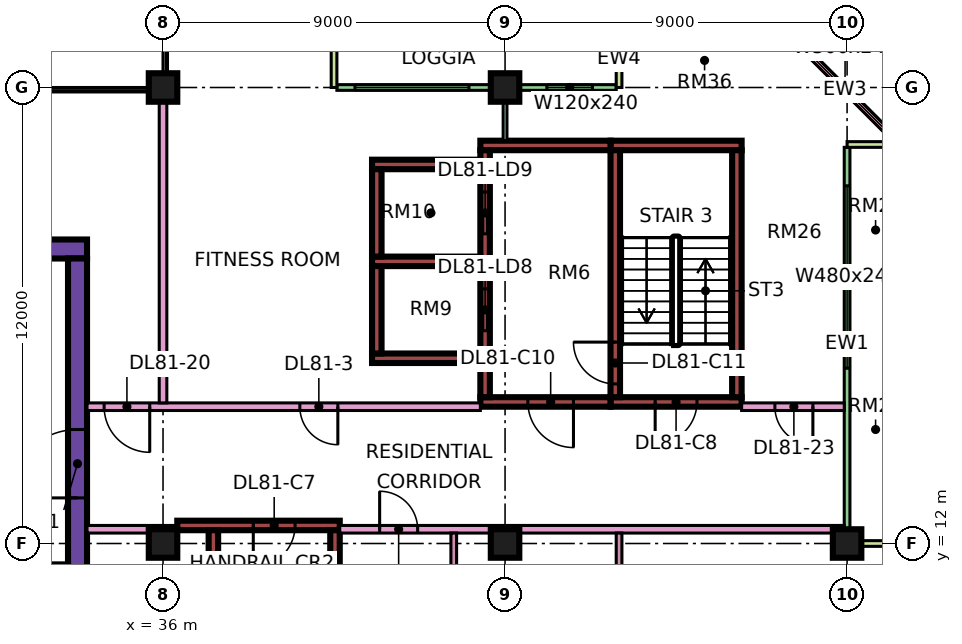
"""IFC4 building model, lengths in metres.
Left out: names, types, materials, properties, quantities, classifications, styles, units other than length and angle.
Written with IfcOpenShell. Run it as: python <this file> out.ifc"""

import sys

from ifc_helpers import new_model, si_unit, direction, frame, frame_2d, origin, origin_2d, place, context, subcontext, project, spatial, rectangle, extrude, element, fill, save


model = new_model("IFC4")
c1 = context("Model", 3, precision=1e-05, world=origin(), true_north=direction((0.0, 1.0)))
c2 = subcontext(c1, "Body", "Model", "MODEL_VIEW")
j1 = project(units=[si_unit("LENGTHUNIT", "METRE"), si_unit("PLANEANGLEUNIT", "RADIAN")], contexts=[c1])
p1 = place(None, origin())
s1 = spatial("IfcSite", under=j1, at=p1, CompositionType="ELEMENT")
p2 = place(p1, origin())
s2 = spatial("IfcBuilding", under=s1, at=p2, CompositionType="ELEMENT")
p3 = place(p2, frame((0.0, 0.0, 350.15)))
s3 = spatial("IfcBuildingStorey", under=s2, at=p3, CompositionType="ELEMENT", Elevation=350.15)
for number, where, z_axis, x_axis in (
    (1, (36.0, 12.0, 0.0), (0.0, 0.0, 1.0), (1.0, 0.0, 0.0)),
    (2, (36.0, 24.0, 0.0), (0.0, 0.0, 1.0), (1.0, 0.0, 0.0)),
    (3, (45.0, 12.0, 0.0), (0.0, 0.0, 1.0), (1.0, 0.0, 0.0)),
    (4, (45.0, 24.0, 0.0), (0.0, 0.0, 1.0), (1.0, 0.0, 0.0)),
    (5, (54.0, 12.0, 0.0), (0.0, 0.0, 1.0), (1.0, 0.0, 0.0)),
):
    element("IfcColumn", number, at=place(p3, frame(where, z_axis=z_axis, x_axis=x_axis)), inside=s3, PredefinedType="COLUMN", context=c2, shape_type="SweptSolid", body=[
        extrude(rectangle(XDim=0.75, YDim=0.75, at=origin_2d()), origin(), (0.0, 0.0, 1.0), 3.75),
    ])
p4 = place(p3, frame((9.0, 19.75, 0.0), z_axis=(0.0, 0.0, 1.0), x_axis=(1.0, 0.0, 0.0)))
e6 = element("IfcWall", 6, at=p4, inside=s3, PredefinedType="SHEAR", context=c2, shape_type="SweptSolid", body=[
    extrude(rectangle(XDim=25.0, YDim=0.5, at=frame_2d((12.5, 0.0))), origin(), (0.0, 0.0, 1.0), 3.75),
])
p5 = place(p4, frame((19.1, 0.0, 0.0)))
e7 = element("IfcOpeningElement", 7, at=p5, cuts=e6, PredefinedType="OPENING", context=c2, shape_type="SweptSolid", body=[
    extrude(rectangle(XDim=1.8, YDim=2.4, at=frame_2d((0.9, 1.2))), frame((0.0, 0.26, 0.0), z_axis=(0.0, -1.0, 0.0), x_axis=(1.0, 0.0, 0.0)), (0.0, 0.0, 1.0), 0.52),
])
p6 = place(p3, frame((33.75, 7.5, 0.0), z_axis=(0.0, 0.0, 1.0), x_axis=(0.0, 1.0, 0.0)))
e8 = element("IfcWall", 8, at=p6, inside=s3, PredefinedType="SHEAR", context=c2, shape_type="SweptSolid", body=[
    extrude(rectangle(XDim=12.0, YDim=0.5, at=frame_2d((6.0, 0.0))), origin(), (0.0, 0.0, 1.0), 3.75),
])
p7 = place(p6, frame((5.7, 0.0, 0.0)))
e9 = element("IfcOpeningElement", 9, at=p7, cuts=e8, PredefinedType="OPENING", context=c2, shape_type="SweptSolid", body=[
    extrude(rectangle(XDim=1.8, YDim=2.4, at=frame_2d((0.9, 1.2))), frame((0.0, 0.26, 0.0), z_axis=(0.0, -1.0, 0.0), x_axis=(1.0, 0.0, 0.0)), (0.0, 0.0, 1.0), 0.52),
])
p8 = place(p3, frame((36.375, 12.475, 0.0), z_axis=(0.0, 0.0, 1.0), x_axis=(1.0, 0.0, 0.0)))
e10 = element("IfcWall", 10, at=p8, inside=s3, PredefinedType="SHEAR", context=c2, shape_type="SweptSolid", body=[
    extrude(rectangle(XDim=4.275, YDim=0.25, at=frame_2d((2.137, 0.0))), origin(), (0.0, 0.0, 1.0), 3.75),
])
p9 = place(p8, frame((2.0, 0.0, 0.0)))
e11 = element("IfcOpeningElement", 11, at=p9, cuts=e10, PredefinedType="OPENING", context=c2, shape_type="SweptSolid", body=[
    extrude(rectangle(XDim=1.1, YDim=2.2, at=frame_2d((0.55, 1.1))), frame((0.0, 0.135, 0.0), z_axis=(0.0, -1.0, 0.0), x_axis=(1.0, 0.0, 0.0)), (0.0, 0.0, 1.0), 0.27),
])
for number, where, z_axis, x_axis in (
    (12, (37.325, 5.85, 0.0), (0.0, 0.0, 1.0), (0.0, 1.0, 0.0)),
    (13, (40.525, 5.85, 0.0), (0.0, 0.0, 1.0), (0.0, 1.0, 0.0)),
):
    element("IfcWall", number, at=place(p3, frame(where, z_axis=z_axis, x_axis=x_axis)), inside=s3, PredefinedType="SHEAR", context=c2, shape_type="SweptSolid", body=[
        extrude(rectangle(XDim=6.5, YDim=0.25, at=frame_2d((3.25, 0.0))), origin(), (0.0, 0.0, 1.0), 3.75),
    ])
p10 = place(p3, frame((47.775, 15.725, 0.0), z_axis=(0.0, 0.0, 1.0), x_axis=(1.0, 0.0, 0.0)))
e14 = element("IfcWall", 14, at=p10, inside=s3, PredefinedType="SHEAR", context=c2, shape_type="SweptSolid", body=[
    extrude(rectangle(XDim=3.45, YDim=0.25, at=frame_2d((1.725, 0.0))), origin(), (0.0, 0.0, 1.0), 3.75),
])
p11 = place(p10, frame((1.175, 0.0, 0.0)))
e15 = element("IfcOpeningElement", 15, at=p11, cuts=e14, PredefinedType="OPENING", context=c2, shape_type="SweptSolid", body=[
    extrude(rectangle(XDim=1.1, YDim=2.2, at=frame_2d((0.55, 1.1))), frame((0.0, 0.135, 0.0), z_axis=(0.0, -1.0, 0.0), x_axis=(1.0, 0.0, 0.0)), (0.0, 0.0, 1.0), 0.27),
])
p12 = place(p3, frame((47.775, 22.475, 0.0), z_axis=(0.0, 0.0, 1.0), x_axis=(1.0, 0.0, 0.0)))
e16 = element("IfcWall", 16, at=p12, inside=s3, PredefinedType="SHEAR", context=c2, shape_type="SweptSolid", body=[
    extrude(rectangle(XDim=3.45, YDim=0.25, at=frame_2d((1.725, 0.0))), origin(), (0.0, 0.0, 1.0), 3.75),
])
p13 = place(p3, frame((47.9, 15.85, 0.0), z_axis=(0.0, 0.0, 1.0), x_axis=(0.0, 1.0, 0.0)))
e17 = element("IfcWall", 17, at=p13, inside=s3, PredefinedType="SHEAR", context=c2, shape_type="SweptSolid", body=[
    extrude(rectangle(XDim=6.5, YDim=0.25, at=frame_2d((3.25, 0.0))), origin(), (0.0, 0.0, 1.0), 3.75),
])
p14 = place(p13, frame((0.35, 0.0, 0.0)))
e18 = element("IfcOpeningElement", 18, at=p14, cuts=e17, PredefinedType="OPENING", context=c2, shape_type="SweptSolid", body=[
    extrude(rectangle(XDim=1.1, YDim=2.2, at=frame_2d((0.55, 1.1))), frame((0.0, 0.135, 0.0), z_axis=(0.0, -1.0, 0.0), x_axis=(1.0, 0.0, 0.0)), (0.0, 0.0, 1.0), 0.27),
])
p15 = place(p3, frame((51.1, 15.85, 0.0), z_axis=(0.0, 0.0, 1.0), x_axis=(0.0, 1.0, 0.0)))
e19 = element("IfcWall", 19, at=p15, inside=s3, PredefinedType="SHEAR", context=c2, shape_type="SweptSolid", body=[
    extrude(rectangle(XDim=6.5, YDim=0.25, at=frame_2d((3.25, 0.0))), origin(), (0.0, 0.0, 1.0), 3.75),
])
p16 = place(p3, frame((44.35, 15.725, 0.0), z_axis=(0.0, 0.0, 1.0), x_axis=(1.0, 0.0, 0.0)))
e20 = element("IfcWall", 20, at=p16, inside=s3, PredefinedType="SHEAR", context=c2, shape_type="SweptSolid", body=[
    extrude(rectangle(XDim=3.425, YDim=0.25, at=frame_2d((1.712, 0.0))), origin(), (0.0, 0.0, 1.0), 3.75),
])
p17 = place(p16, frame((1.25, 0.0, 0.0)))
e21 = element("IfcOpeningElement", 21, at=p17, cuts=e20, PredefinedType="OPENING", context=c2, shape_type="SweptSolid", body=[
    extrude(rectangle(XDim=1.2, YDim=2.2, at=frame_2d((0.6, 1.1))), frame((0.0, 0.135, 0.0), z_axis=(0.0, -1.0, 0.0), x_axis=(1.0, 0.0, 0.0)), (0.0, 0.0, 1.0), 0.27),
])
p18 = place(p3, frame((44.35, 22.475, 0.0), z_axis=(0.0, 0.0, 1.0), x_axis=(1.0, 0.0, 0.0)))
e22 = element("IfcWall", 22, at=p18, inside=s3, PredefinedType="SHEAR", context=c2, shape_type="SweptSolid", body=[
    extrude(rectangle(XDim=3.425, YDim=0.25, at=frame_2d((1.712, 0.0))), origin(), (0.0, 0.0, 1.0), 3.75),
])
p19 = place(p3, frame((44.475, 15.85, 0.0), z_axis=(0.0, 0.0, 1.0), x_axis=(0.0, 1.0, 0.0)))
e23 = element("IfcWall", 23, at=p19, inside=s3, PredefinedType="SHEAR", context=c2, shape_type="SweptSolid", body=[
    extrude(rectangle(XDim=6.5, YDim=0.25, at=frame_2d((3.25, 0.0))), origin(), (0.0, 0.0, 1.0), 3.75),
])
p20 = place(p19, frame((1.75, 0.0, 0.0)))
e24 = element("IfcOpeningElement", 24, at=p20, cuts=e23, PredefinedType="OPENING", context=c2, shape_type="SweptSolid", body=[
    extrude(rectangle(XDim=1.1, YDim=2.2, at=frame_2d((0.55, 1.1))), frame((0.0, 0.135, 0.0), z_axis=(0.0, -1.0, 0.0), x_axis=(1.0, 0.0, 0.0)), (0.0, 0.0, 1.0), 0.27),
])
p21 = place(p19, frame((4.3, 0.0, 0.0)))
e25 = element("IfcOpeningElement", 25, at=p21, cuts=e23, PredefinedType="OPENING", context=c2, shape_type="SweptSolid", body=[
    extrude(rectangle(XDim=1.1, YDim=2.2, at=frame_2d((0.55, 1.1))), frame((0.0, 0.135, 0.0), z_axis=(0.0, -1.0, 0.0), x_axis=(1.0, 0.0, 0.0)), (0.0, 0.0, 1.0), 0.27),
])
for number, where, z_axis, x_axis in (
    (26, (41.5, 16.875, 0.0), (0.0, 0.0, 1.0), (1.0, 0.0, 0.0)),
    (27, (41.5, 19.425, 0.0), (0.0, 0.0, 1.0), (1.0, 0.0, 0.0)),
    (28, (41.5, 21.975, 0.0), (0.0, 0.0, 1.0), (1.0, 0.0, 0.0)),
):
    element("IfcWall", number, at=place(p3, frame(where, z_axis=z_axis, x_axis=x_axis)), inside=s3, PredefinedType="SHEAR", context=c2, shape_type="SweptSolid", body=[
        extrude(rectangle(XDim=2.85, YDim=0.25, at=frame_2d((1.425, 0.0))), origin(), (0.0, 0.0, 1.0), 3.75),
    ])
for number, where, z_axis, x_axis in (
    (29, (41.625, 17.0, 0.0), (0.0, 0.0, 1.0), (0.0, 1.0, 0.0)),
    (30, (41.625, 19.55, 0.0), (0.0, 0.0, 1.0), (0.0, 1.0, 0.0)),
):
    element("IfcWall", number, at=place(p3, frame(where, z_axis=z_axis, x_axis=x_axis)), inside=s3, PredefinedType="SHEAR", context=c2, shape_type="SweptSolid", body=[
        extrude(rectangle(XDim=2.3, YDim=0.25, at=frame_2d((1.15, 0.0))), origin(), (0.0, 0.0, 1.0), 3.75),
    ])
p22 = place(p3, frame((47.925, 24.0, 0.0), z_axis=(0.0, 0.0, 1.0), x_axis=(-1.0, 0.0, 0.0)))
e31 = element("IfcWall", 31, at=p22, inside=s3, PredefinedType="SOLIDWALL", context=c2, shape_type="SweptSolid", body=[
    extrude(rectangle(XDim=7.35, YDim=0.15, at=frame_2d((3.675, 0.0))), origin(), (0.0, 0.0, 1.0), 3.35),
])
p23 = place(p22, frame((0.625, 0.0, 0.45)))
e32 = element("IfcOpeningElement", 32, at=p23, cuts=e31, PredefinedType="OPENING", context=c2, shape_type="SweptSolid", body=[
    extrude(rectangle(XDim=1.2, YDim=2.4, at=frame_2d((0.6, 1.2))), frame((0.0, 0.085, 0.0), z_axis=(0.0, -1.0, 0.0), x_axis=(1.0, 0.0, 0.0)), (0.0, 0.0, 1.0), 0.17),
])
p24 = place(p22, frame((3.875, 0.0, 0.45)))
e33 = element("IfcOpeningElement", 33, at=p24, cuts=e31, PredefinedType="OPENING", context=c2, shape_type="SweptSolid", body=[
    extrude(rectangle(XDim=3.0, YDim=2.4, at=frame_2d((1.5, 1.2))), frame((0.0, 0.085, 0.0), z_axis=(0.0, -1.0, 0.0), x_axis=(1.0, 0.0, 0.0)), (0.0, 0.0, 1.0), 0.17),
])
for number, where, z_axis, x_axis in (
    (34, (48.0, 25.5, 0.0), (0.0, 0.0, 1.0), (0.0, -1.0, 0.0)),
    (35, (40.5, 25.5, 0.0), (0.0, 0.0, 1.0), (0.0, -1.0, 0.0)),
):
    element("IfcWall", number, at=place(p3, frame(where, z_axis=z_axis, x_axis=x_axis)), inside=s3, PredefinedType="SOLIDWALL", context=c2, shape_type="SweptSolid", body=[
        extrude(rectangle(XDim=1.5, YDim=0.15, at=frame_2d((0.75, 0.0))), origin(), (0.0, 0.0, 1.0), 3.35),
    ])
p25 = place(p3, frame((54.0, 12.075, 0.0), z_axis=(0.0, 0.0, 1.0), x_axis=(0.0, 1.0, 0.0)))
e36 = element("IfcWall", 36, at=p25, inside=s3, PredefinedType="SOLIDWALL", context=c2, shape_type="SweptSolid", body=[
    extrude(rectangle(XDim=10.35, YDim=0.15, at=frame_2d((5.175, 0.0))), origin(), (0.0, 0.0, 1.0), 3.35),
])
p26 = place(p25, frame((4.538, 0.0, 0.45)))
e37 = element("IfcOpeningElement", 37, at=p26, cuts=e36, PredefinedType="OPENING", context=c2, shape_type="SweptSolid", body=[
    extrude(rectangle(XDim=4.8, YDim=2.4, at=frame_2d((2.4, 1.2))), frame((0.0, 0.085, 0.0), z_axis=(0.0, -1.0, 0.0), x_axis=(1.0, 0.0, 0.0)), (0.0, 0.0, 1.0), 0.17),
])
for number, where, z_axis, x_axis in (
    (38, (55.5, 12.0, 0.0), (0.0, 0.0, 1.0), (-1.0, 0.0, 0.0)),
    (39, (55.5, 22.5, 0.0), (0.0, 0.0, 1.0), (-1.0, 0.0, 0.0)),
):
    element("IfcWall", number, at=place(p3, frame(where, z_axis=z_axis, x_axis=x_axis)), inside=s3, PredefinedType="SOLIDWALL", context=c2, shape_type="SweptSolid", body=[
        extrude(rectangle(XDim=1.5, YDim=0.15, at=frame_2d((0.75, 0.0))), origin(), (0.0, 0.0, 1.0), 3.35),
    ])
p27 = place(p3, frame((55.447, 22.447, 0.0), z_axis=(0.0, 0.0, 1.0), x_axis=(-0.707106781187, 0.707106781187, 0.0)))
e40 = element("IfcWall", 40, at=p27, inside=s3, PredefinedType="SOLIDWALL", context=c2, shape_type="SweptSolid", body=[
    extrude(rectangle(XDim=4.243, YDim=0.15, at=frame_2d((2.121, 0.0))), origin(), (0.0, 0.0, 1.0), 3.35),
])
p28 = place(p27, frame((0.621, 0.0, 0.45)))
e41 = element("IfcOpeningElement", 41, at=p28, cuts=e40, PredefinedType="OPENING", context=c2, shape_type="SweptSolid", body=[
    extrude(rectangle(XDim=3.0, YDim=2.4, at=frame_2d((1.5, 1.2))), frame((0.0, 0.085, 0.0), z_axis=(0.0, -1.0, 0.0), x_axis=(1.0, 0.0, 0.0)), (0.0, 0.0, 1.0), 0.17),
])
p29 = place(p3, frame((34.0, 12.375, 0.0), z_axis=(0.0, 0.0, 1.0), x_axis=(1.0, 0.0, 0.0)))
e42 = element("IfcWall", 42, at=p29, inside=s3, PredefinedType="PARTITIONING", context=c2, shape_type="SweptSolid", body=[
    extrude(rectangle(XDim=2.376, YDim=0.2, at=frame_2d((1.188, 0.0))), origin(), (0.0, 0.0, 1.0), 3.35),
])
p30 = place(p3, frame((34.0, 15.6, 0.0), z_axis=(0.0, 0.0, 1.0), x_axis=(1.0, 0.0, 0.0)))
e43 = element("IfcWall", 43, at=p30, inside=s3, PredefinedType="PARTITIONING", context=c2, shape_type="SweptSolid", body=[
    extrude(rectangle(XDim=10.35, YDim=0.2, at=frame_2d((5.175, 0.0))), origin(), (0.0, 0.0, 1.0), 3.35),
])
p31 = place(p30, frame((5.6, 0.0, 0.0)))
e44 = element("IfcOpeningElement", 44, at=p31, cuts=e43, PredefinedType="OPENING", context=c2, shape_type="SweptSolid", body=[
    extrude(rectangle(XDim=1.0, YDim=2.1, at=frame_2d((0.5, 1.05))), frame((0.0, 0.11, 0.0), z_axis=(0.0, -1.0, 0.0), x_axis=(1.0, 0.0, 0.0)), (0.0, 0.0, 1.0), 0.22),
])
p32 = place(p30, frame((0.45, 0.0, 0.0)))
e45 = element("IfcOpeningElement", 45, at=p32, cuts=e43, PredefinedType="OPENING", context=c2, shape_type="SweptSolid", body=[
    extrude(rectangle(XDim=1.2, YDim=2.1, at=frame_2d((0.6, 1.05))), frame((0.0, 0.11, 0.0), z_axis=(0.0, -1.0, 0.0), x_axis=(1.0, 0.0, 0.0)), (0.0, 0.0, 1.0), 0.22),
])
p33 = place(p3, frame((36.0, 15.7, 0.0), z_axis=(0.0, 0.0, 1.0), x_axis=(0.0, 1.0, 0.0)))
e46 = element("IfcWall", 46, at=p33, inside=s3, PredefinedType="PARTITIONING", context=c2, shape_type="SweptSolid", body=[
    extrude(rectangle(XDim=8.3, YDim=0.2, at=frame_2d((4.15, 0.0))), origin(), (0.0, 0.0, 1.0), 3.35),
])
p34 = place(p3, frame((40.65, 12.375, 0.0), z_axis=(0.0, 0.0, 1.0), x_axis=(1.0, 0.0, 0.0)))
e47 = element("IfcWall", 47, at=p34, inside=s3, PredefinedType="PARTITIONING", context=c2, shape_type="SweptSolid", body=[
    extrude(rectangle(XDim=13.276, YDim=0.2, at=frame_2d((6.638, 0.0))), origin(), (0.0, 0.0, 1.0), 3.35),
])
p35 = place(p34, frame((1.05, 0.0, 0.0)))
e48 = element("IfcOpeningElement", 48, at=p35, cuts=e47, PredefinedType="OPENING", context=c2, shape_type="SweptSolid", body=[
    extrude(rectangle(XDim=1.0, YDim=2.1, at=frame_2d((0.5, 1.05))), frame((0.0, 0.11, 0.0), z_axis=(0.0, -1.0, 0.0), x_axis=(1.0, 0.0, 0.0)), (0.0, 0.0, 1.0), 0.22),
])
p36 = place(p3, frame((43.65, 5.975, 0.0), z_axis=(0.0, 0.0, 1.0), x_axis=(0.0, 1.0, 0.0)))
e49 = element("IfcWall", 49, at=p36, inside=s3, PredefinedType="PARTITIONING", context=c2, shape_type="SweptSolid", body=[
    extrude(rectangle(XDim=6.3, YDim=0.15, at=frame_2d((3.15, 0.0))), origin(), (0.0, 0.0, 1.0), 3.35),
])
p37 = place(p36, frame((4.275, 0.0, 0.0)))
e50 = element("IfcOpeningElement", 50, at=p37, cuts=e49, PredefinedType="OPENING", context=c2, shape_type="SweptSolid", body=[
    extrude(rectangle(XDim=0.9, YDim=2.1, at=frame_2d((0.45, 1.05))), frame((0.0, 0.085, 0.0), z_axis=(0.0, -1.0, 0.0), x_axis=(1.0, 0.0, 0.0)), (0.0, 0.0, 1.0), 0.17),
])
p38 = place(p3, frame((45.0, 22.6, 0.0), z_axis=(0.0, 0.0, 1.0), x_axis=(0.0, 1.0, 0.0)))
e51 = element("IfcWall", 51, at=p38, inside=s3, PredefinedType="PARTITIONING", context=c2, shape_type="SweptSolid", body=[
    extrude(rectangle(XDim=1.326, YDim=0.1, at=frame_2d((0.663, 0.0))), origin(), (0.0, 0.0, 1.0), 3.35),
])
p39 = place(p3, frame((48.0, 5.975, 0.0), z_axis=(0.0, 0.0, 1.0), x_axis=(0.0, 1.0, 0.0)))
e52 = element("IfcWall", 52, at=p39, inside=s3, PredefinedType="PARTITIONING", context=c2, shape_type="SweptSolid", body=[
    extrude(rectangle(XDim=6.3, YDim=0.15, at=frame_2d((3.15, 0.0))), origin(), (0.0, 0.0, 1.0), 3.35),
])
p40 = place(p3, frame((51.225, 15.6, 0.0), z_axis=(0.0, 0.0, 1.0), x_axis=(1.0, 0.0, 0.0)))
e53 = element("IfcWall", 53, at=p40, inside=s3, PredefinedType="PARTITIONING", context=c2, shape_type="SweptSolid", body=[
    extrude(rectangle(XDim=2.701, YDim=0.2, at=frame_2d((1.351, 0.0))), origin(), (0.0, 0.0, 1.0), 3.35),
])
p41 = place(p40, frame((0.875, 0.0, 0.0)))
e54 = element("IfcOpeningElement", 54, at=p41, cuts=e53, PredefinedType="OPENING", context=c2, shape_type="SweptSolid", body=[
    extrude(rectangle(XDim=1.0, YDim=2.1, at=frame_2d((0.5, 1.05))), frame((0.0, 0.11, 0.0), z_axis=(0.0, -1.0, 0.0), x_axis=(1.0, 0.0, 0.0)), (0.0, 0.0, 1.0), 0.22),
])
p42 = place(p23, origin())
e55 = element("IfcWindow", 55, at=p42, inside=s3, PartitioningType="SINGLE_PANEL", PredefinedType="WINDOW", context=c2, shape_type="SweptSolid", body=[
    extrude(rectangle(XDim=1.2, YDim=2.4, at=frame_2d((0.6, 1.2))), frame((0.0, 0.03, 0.0), z_axis=(0.0, -1.0, 0.0), x_axis=(1.0, 0.0, 0.0)), (0.0, 0.0, 1.0), 0.06),
])
fill(e32, e55)
p43 = place(p24, origin())
e56 = element("IfcWindow", 56, at=p43, inside=s3, PartitioningType="SINGLE_PANEL", PredefinedType="WINDOW", context=c2, shape_type="SweptSolid", body=[
    extrude(rectangle(XDim=3.0, YDim=2.4, at=frame_2d((1.5, 1.2))), frame((0.0, 0.03, 0.0), z_axis=(0.0, -1.0, 0.0), x_axis=(1.0, 0.0, 0.0)), (0.0, 0.0, 1.0), 0.06),
])
fill(e33, e56)
p44 = place(p26, origin())
e57 = element("IfcWindow", 57, at=p44, inside=s3, PartitioningType="SINGLE_PANEL", PredefinedType="WINDOW", context=c2, shape_type="SweptSolid", body=[
    extrude(rectangle(XDim=4.8, YDim=2.4, at=frame_2d((2.4, 1.2))), frame((0.0, 0.03, 0.0), z_axis=(0.0, -1.0, 0.0), x_axis=(1.0, 0.0, 0.0)), (0.0, 0.0, 1.0), 0.06),
])
fill(e37, e57)
p45 = place(p28, origin())
e58 = element("IfcWindow", 58, at=p45, inside=s3, PartitioningType="SINGLE_PANEL", PredefinedType="WINDOW", context=c2, shape_type="SweptSolid", body=[
    extrude(rectangle(XDim=3.0, YDim=2.4, at=frame_2d((1.5, 1.2))), frame((0.0, 0.03, 0.0), z_axis=(0.0, -1.0, 0.0), x_axis=(1.0, 0.0, 0.0)), (0.0, 0.0, 1.0), 0.06),
])
fill(e41, e58)
p46 = place(p7, origin())
e59 = element("IfcDoor", 59, at=p46, inside=s3, OperationType="DOUBLE_DOOR_SINGLE_SWING", PredefinedType="DOOR", context=c2, shape_type="SweptSolid", body=[
    extrude(rectangle(XDim=1.8, YDim=2.4, at=frame_2d((0.9, 1.2))), frame((0.0, 0.025, 0.0), z_axis=(0.0, -1.0, 0.0), x_axis=(1.0, 0.0, 0.0)), (0.0, 0.0, 1.0), 0.05),
])
fill(e9, e59)
p47 = place(p9, frame((1.1, 0.0, 0.0), z_axis=(0.0, 0.0, 1.0), x_axis=(-1.0, 0.0, 0.0)))
e60 = element("IfcDoor", 60, at=p47, inside=s3, OperationType="SINGLE_SWING_LEFT", PredefinedType="DOOR", context=c2, shape_type="SweptSolid", body=[
    extrude(rectangle(XDim=1.1, YDim=2.2, at=frame_2d((0.55, 1.1))), frame((0.0, 0.025, 0.0), z_axis=(0.0, -1.0, 0.0), x_axis=(1.0, 0.0, 0.0)), (0.0, 0.0, 1.0), 0.05),
])
fill(e11, e60)
p48 = place(p11, frame((1.1, 0.0, 0.0), z_axis=(0.0, 0.0, 1.0), x_axis=(-1.0, 0.0, 0.0)))
e61 = element("IfcDoor", 61, at=p48, inside=s3, OperationType="SINGLE_SWING_LEFT", PredefinedType="DOOR", context=c2, shape_type="SweptSolid", body=[
    extrude(rectangle(XDim=1.1, YDim=2.2, at=frame_2d((0.55, 1.1))), frame((0.0, 0.025, 0.0), z_axis=(0.0, -1.0, 0.0), x_axis=(1.0, 0.0, 0.0)), (0.0, 0.0, 1.0), 0.05),
])
fill(e15, e61)
p49 = place(p17, origin())
e62 = element("IfcDoor", 62, at=p49, inside=s3, OperationType="SINGLE_SWING_RIGHT", PredefinedType="DOOR", context=c2, shape_type="SweptSolid", body=[
    extrude(rectangle(XDim=1.2, YDim=2.2, at=frame_2d((0.6, 1.1))), frame((0.0, 0.025, 0.0), z_axis=(0.0, -1.0, 0.0), x_axis=(1.0, 0.0, 0.0)), (0.0, 0.0, 1.0), 0.05),
])
fill(e21, e62)
p50 = place(p14, frame((1.1, 0.0, 0.0), z_axis=(0.0, 0.0, 1.0), x_axis=(-1.0, 0.0, 0.0)))
e63 = element("IfcDoor", 63, at=p50, inside=s3, OperationType="SINGLE_SWING_RIGHT", PredefinedType="DOOR", context=c2, shape_type="SweptSolid", body=[
    extrude(rectangle(XDim=1.1, YDim=2.2, at=frame_2d((0.55, 1.1))), frame((0.0, 0.025, 0.0), z_axis=(0.0, -1.0, 0.0), x_axis=(1.0, 0.0, 0.0)), (0.0, 0.0, 1.0), 0.05),
])
fill(e18, e63)
p51 = place(p20, origin())
e64 = element("IfcDoor", 64, at=p51, inside=s3, OperationType="DOUBLE_DOOR_SLIDING", PredefinedType="DOOR", context=c2, shape_type="SweptSolid", body=[
    extrude(rectangle(XDim=1.1, YDim=2.2, at=frame_2d((0.55, 1.1))), frame((0.0, 0.025, 0.0), z_axis=(0.0, -1.0, 0.0), x_axis=(1.0, 0.0, 0.0)), (0.0, 0.0, 1.0), 0.05),
])
fill(e24, e64)
p52 = place(p21, origin())
e65 = element("IfcDoor", 65, at=p52, inside=s3, OperationType="DOUBLE_DOOR_SLIDING", PredefinedType="DOOR", context=c2, shape_type="SweptSolid", body=[
    extrude(rectangle(XDim=1.1, YDim=2.2, at=frame_2d((0.55, 1.1))), frame((0.0, 0.025, 0.0), z_axis=(0.0, -1.0, 0.0), x_axis=(1.0, 0.0, 0.0)), (0.0, 0.0, 1.0), 0.05),
])
fill(e25, e65)
p53 = place(p31, origin())
e66 = element("IfcDoor", 66, at=p53, inside=s3, OperationType="SINGLE_SWING_RIGHT", PredefinedType="DOOR", context=c2, shape_type="SweptSolid", body=[
    extrude(rectangle(XDim=1.0, YDim=2.1, at=frame_2d((0.5, 1.05))), frame((0.0, 0.025, 0.0), z_axis=(0.0, -1.0, 0.0), x_axis=(1.0, 0.0, 0.0)), (0.0, 0.0, 1.0), 0.05),
])
fill(e44, e66)
p54 = place(p32, origin())
e67 = element("IfcDoor", 67, at=p54, inside=s3, OperationType="SINGLE_SWING_RIGHT", PredefinedType="DOOR", context=c2, shape_type="SweptSolid", body=[
    extrude(rectangle(XDim=1.2, YDim=2.1, at=frame_2d((0.6, 1.05))), frame((0.0, 0.025, 0.0), z_axis=(0.0, -1.0, 0.0), x_axis=(1.0, 0.0, 0.0)), (0.0, 0.0, 1.0), 0.05),
])
fill(e45, e67)
p55 = place(p41, origin())
e68 = element("IfcDoor", 68, at=p55, inside=s3, OperationType="SINGLE_SWING_RIGHT", PredefinedType="DOOR", context=c2, shape_type="SweptSolid", body=[
    extrude(rectangle(XDim=1.0, YDim=2.1, at=frame_2d((0.5, 1.05))), frame((0.0, 0.025, 0.0), z_axis=(0.0, -1.0, 0.0), x_axis=(1.0, 0.0, 0.0)), (0.0, 0.0, 1.0), 0.05),
])
fill(e54, e68)
p56 = place(p35, origin())
e69 = element("IfcDoor", 69, at=p56, inside=s3, OperationType="SINGLE_SWING_LEFT", PredefinedType="DOOR", context=c2, shape_type="SweptSolid", body=[
    extrude(rectangle(XDim=1.0, YDim=2.1, at=frame_2d((0.5, 1.05))), frame((0.0, 0.025, 0.0), z_axis=(0.0, -1.0, 0.0), x_axis=(1.0, 0.0, 0.0)), (0.0, 0.0, 1.0), 0.05),
])
fill(e48, e69)
save(model, sys.argv[1])
